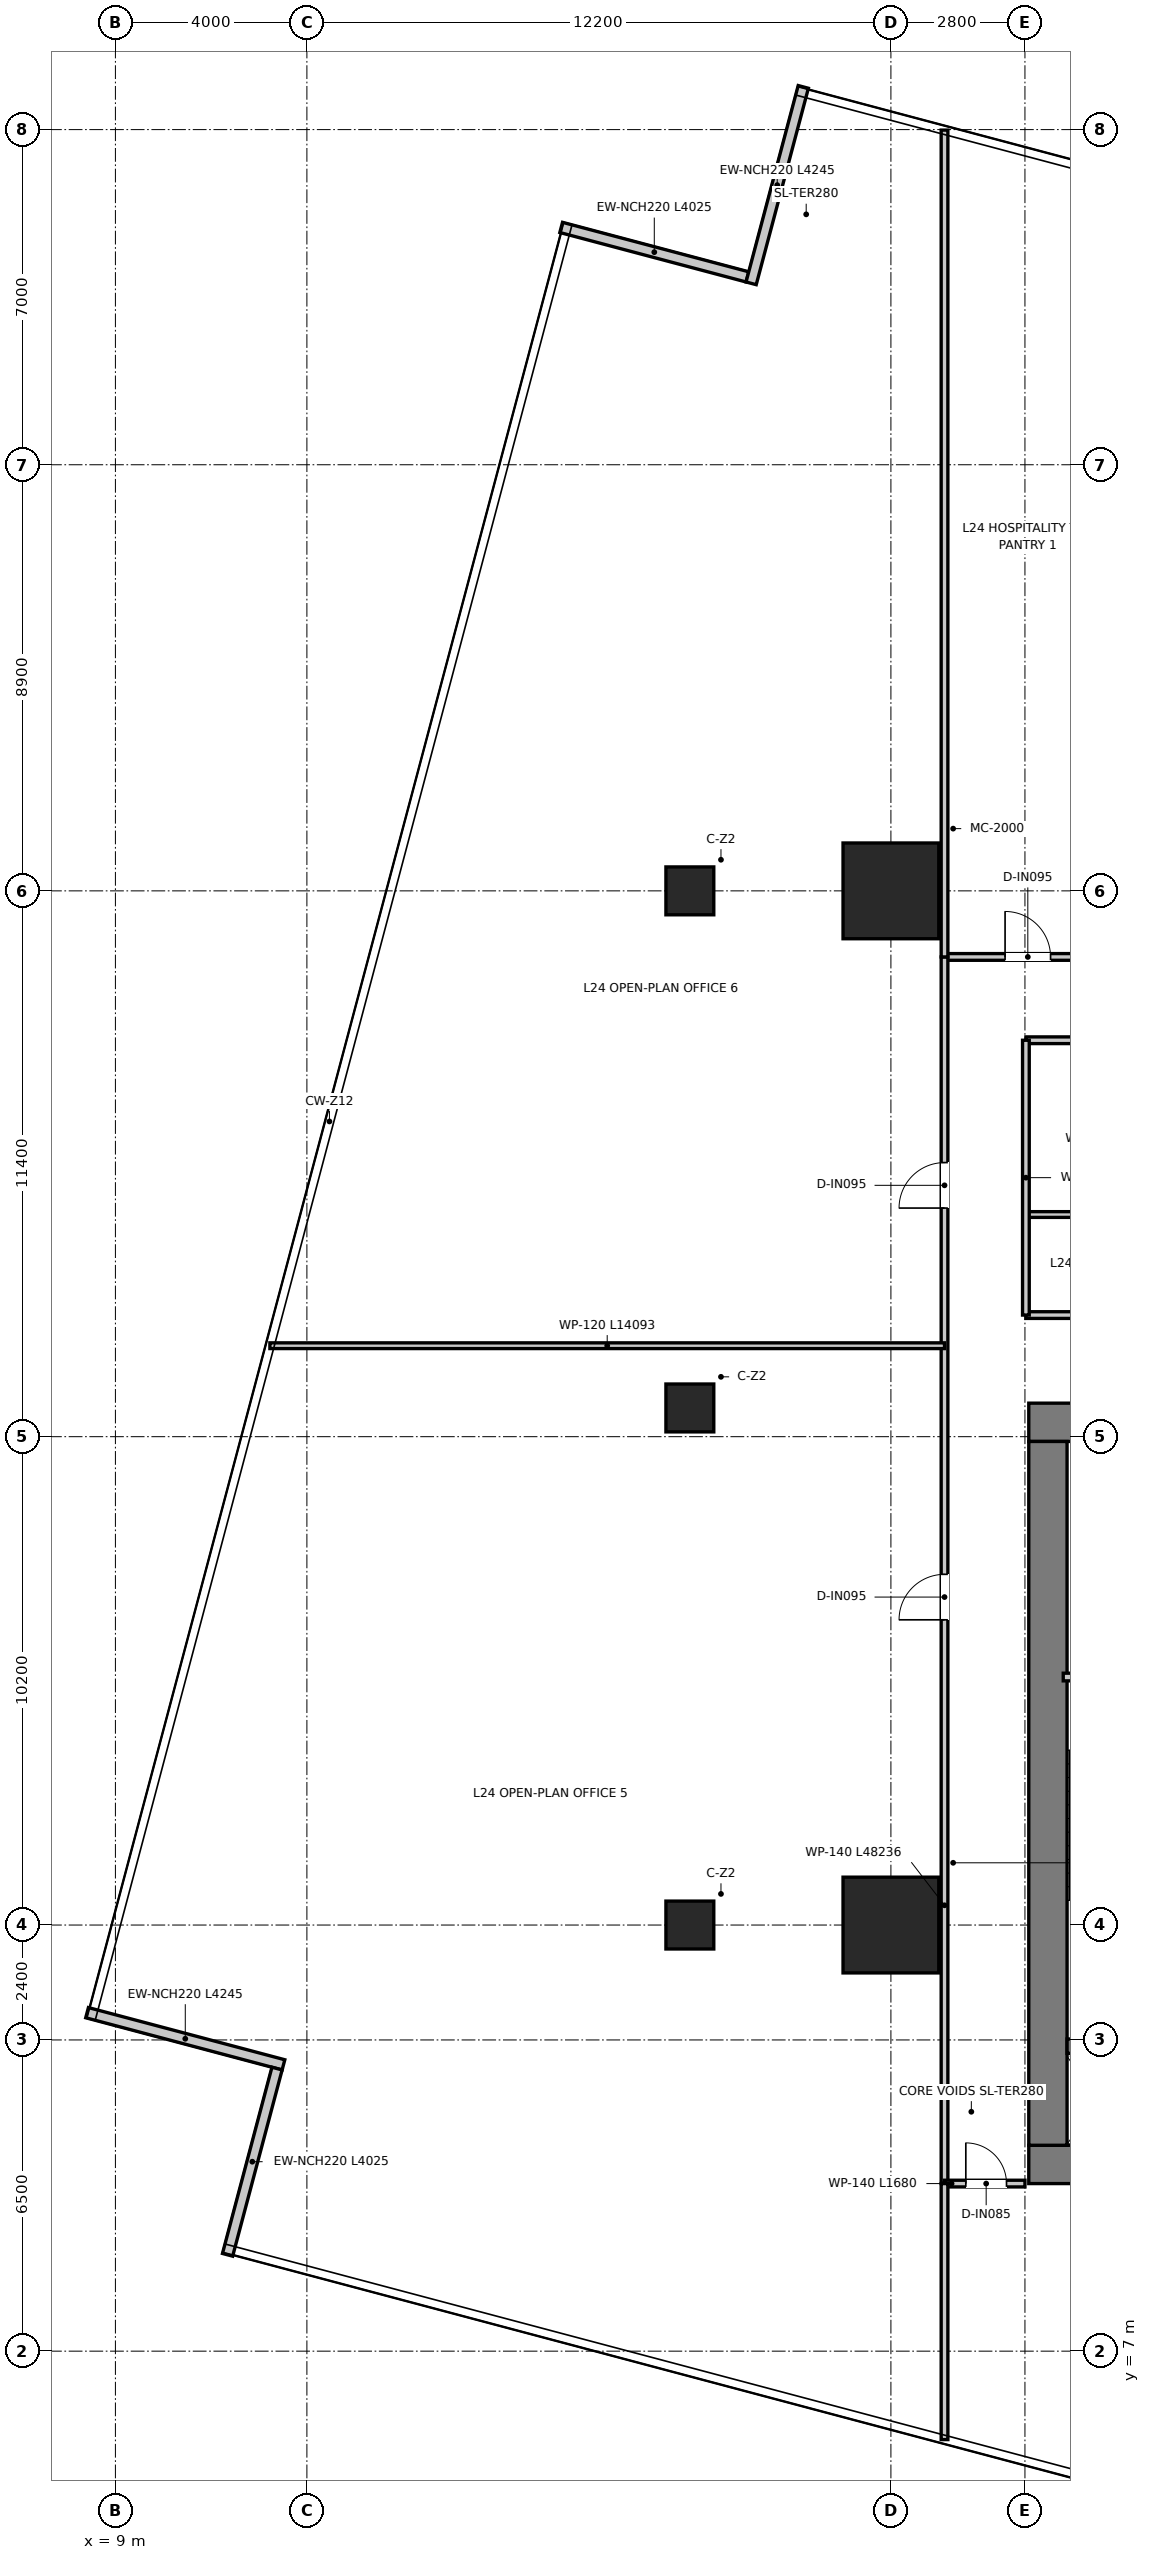
"""IFC4 building model, lengths in metres.
Left out: names, types, materials, properties, quantities, classifications, styles, units other than length and angle.
Written with IfcOpenShell. Run it as: python <this file> out.ifc"""

import sys

from ifc_helpers import new_model, si_unit, direction, frame, frame_2d, origin, origin_2d, place, context, subcontext, project, spatial, rectangle, extrude, source, transform, mapped, element, fill, save


model = new_model("IFC4")
c1 = context("Model", 3, precision=1e-05, world=origin(), true_north=direction((0.0, 1.0)))
c2 = subcontext(c1, "Body", "Model", "MODEL_VIEW")
j1 = project(units=[si_unit("LENGTHUNIT", "METRE"), si_unit("PLANEANGLEUNIT", "RADIAN")], contexts=[c1])
p1 = place(None, origin())
s1 = spatial("IfcSite", under=j1, at=p1, CompositionType="ELEMENT")
p2 = place(p1, origin())
s2 = spatial("IfcBuilding", under=s1, at=p2, CompositionType="ELEMENT")
p3 = place(p2, frame((0.0, 0.0, 101.9)))
s3 = spatial("IfcBuildingStorey", under=s2, at=p3, CompositionType="ELEMENT", Elevation=101.9)
p4 = place(p3, frame((28.08, 10.9, 0.0), z_axis=(0.0, 0.0, 1.0), x_axis=(1.0, 0.0, 0.0)))
e1 = element("IfcWall", 1, at=p4, inside=s3, PredefinedType="SHEAR", context=c2, shape_type="SweptSolid", body=[
    extrude(rectangle(XDim=15.84, YDim=0.8, at=frame_2d((7.92, 0.0))), origin(), (0.0, 0.0, 1.0), 3.95),
])
p5 = place(p3, frame((28.08, 26.4, 0.0), z_axis=(0.0, 0.0, 1.0), x_axis=(1.0, 0.0, 0.0)))
e2 = element("IfcWall", 2, at=p5, inside=s3, PredefinedType="SHEAR", context=c2, shape_type="SweptSolid", body=[
    extrude(rectangle(XDim=15.84, YDim=0.8, at=frame_2d((7.92, 0.0))), origin(), (0.0, 0.0, 1.0), 3.95),
])
p6 = place(p5, frame((7.22, 0.0, 0.0)))
e3 = element("IfcOpeningElement", 3, at=p6, cuts=e2, PredefinedType="OPENING", context=c2, shape_type="SweptSolid", body=[
    extrude(rectangle(XDim=1.4, YDim=2.2, at=frame_2d((0.7, 1.1))), frame((0.0, 0.41, 0.0), z_axis=(0.0, -1.0, 0.0), x_axis=(1.0, 0.0, 0.0)), (0.0, 0.0, 1.0), 0.82),
])
p7 = place(p5, frame((1.775, 0.0, 0.0)))
e4 = element("IfcOpeningElement", 4, at=p7, cuts=e2, PredefinedType="OPENING", context=c2, shape_type="SweptSolid", body=[
    extrude(rectangle(XDim=1.05, YDim=2.1, at=frame_2d((0.525, 1.05))), frame((0.0, 0.41, 0.0), z_axis=(0.0, -1.0, 0.0), x_axis=(1.0, 0.0, 0.0)), (0.0, 0.0, 1.0), 0.82),
])
p8 = place(p5, frame((13.015, 0.0, 0.0)))
e5 = element("IfcOpeningElement", 5, at=p8, cuts=e2, PredefinedType="OPENING", context=c2, shape_type="SweptSolid", body=[
    extrude(rectangle(XDim=1.05, YDim=2.1, at=frame_2d((0.525, 1.05))), frame((0.0, 0.41, 0.0), z_axis=(0.0, -1.0, 0.0), x_axis=(1.0, 0.0, 0.0)), (0.0, 0.0, 1.0), 0.82),
])
p9 = place(p3, frame((28.48, 11.3, 0.0), z_axis=(0.0, 0.0, 1.0), x_axis=(0.0, 1.0, 0.0)))
e6 = element("IfcWall", 6, at=p9, inside=s3, PredefinedType="SHEAR", context=c2, shape_type="SweptSolid", body=[
    extrude(rectangle(XDim=14.7, YDim=0.8, at=frame_2d((7.35, 0.0))), origin(), (0.0, 0.0, 1.0), 3.95),
])
p10 = place(p3, frame((28.88, 13.37, 0.0), z_axis=(0.0, 0.0, 1.0), x_axis=(1.0, 0.0, 0.0)))
e7 = element("IfcWall", 7, at=p10, inside=s3, PredefinedType="SHEAR", context=c2, shape_type="SweptSolid", body=[
    extrude(rectangle(XDim=3.1, YDim=0.3, at=frame_2d((1.55, 0.0))), origin(), (0.0, 0.0, 1.0), 3.95),
])
m1 = source(origin(), c2, "Body", "SweptSolid", [
    extrude(rectangle(XDim=2.0, YDim=2.0, at=origin_2d()), origin(), (0.0, 0.0, 1.0), 3.95),
])
for number, where, z_axis, x_axis in (
    (8, (25.2, 15.9, 0.0), (0.0, 0.0, 1.0), (1.0, 0.0, 0.0)),
    (9, (25.2, 37.5, 0.0), (0.0, 0.0, 1.0), (1.0, 0.0, 0.0)),
):
    element("IfcColumn", number, at=place(p3, frame(where, z_axis=z_axis, x_axis=x_axis)), inside=s3, PredefinedType="USERDEFINED", context=c2, shape_type="MappedRepresentation", body=[
        mapped(m1, transform((0.0, 0.0, 0.0), x_axis=(1.0, 0.0, 0.0), y_axis=(0.0, 1.0, 0.0), z_axis=(0.0, 0.0, 1.0), scale=1.0)),
    ])
m2 = source(origin(), c2, "Body", "SweptSolid", [
    extrude(rectangle(XDim=1.0, YDim=1.0, at=origin_2d()), origin(), (0.0, 0.0, 1.0), 3.95),
])
for number, where, z_axis, x_axis in (
    (10, (21.0, 15.9, 0.0), (0.0, 0.0, 1.0), (1.0, 0.0, 0.0)),
    (11, (21.0, 26.7, 0.0), (0.0, 0.0, 1.0), (1.0, 0.0, 0.0)),
    (12, (21.0, 37.5, 0.0), (0.0, 0.0, 1.0), (1.0, 0.0, 0.0)),
):
    element("IfcColumn", number, at=place(p3, frame(where, z_axis=z_axis, x_axis=x_axis)), inside=s3, PredefinedType="COLUMN", context=c2, shape_type="MappedRepresentation", body=[
        mapped(m2, transform((0.0, 0.0, 0.0), x_axis=(1.0, 0.0, 0.0), y_axis=(0.0, 1.0, 0.0), z_axis=(0.0, 0.0, 1.0), scale=1.0)),
    ])
p11 = place(p3, frame((22.202, 50.324, 0.0), z_axis=(0.0, 0.0, 1.0), x_axis=(-0.966492181189, 0.256696053144, 0.0)))
e13 = element("IfcWall", 13, at=p11, inside=s3, PredefinedType="ELEMENTEDWALL", context=c2, shape_type="SweptSolid", body=[
    extrude(rectangle(XDim=4.025, YDim=0.22, at=frame_2d((2.012, 0.0))), origin(), (0.0, 0.0, 1.0), 3.67),
])
p12 = place(p3, frame((8.408, 14.07, 0.0), z_axis=(0.0, 0.0, 1.0), x_axis=(0.966496943173, -0.256678123022, 0.0)))
e14 = element("IfcWall", 14, at=p12, inside=s3, PredefinedType="ELEMENTEDWALL", context=c2, shape_type="SweptSolid", body=[
    extrude(rectangle(XDim=4.245, YDim=0.22, at=frame_2d((2.123, 0.0))), origin(), (0.0, 0.0, 1.0), 3.67),
])
p13 = place(p3, frame((12.376, 12.902, 0.0), z_axis=(0.0, 0.0, 1.0), x_axis=(-0.256696053144, -0.966492181189, 0.0)))
e15 = element("IfcWall", 15, at=p13, inside=s3, PredefinedType="ELEMENTEDWALL", context=c2, shape_type="SweptSolid", body=[
    extrude(rectangle(XDim=4.025, YDim=0.22, at=frame_2d((2.012, 0.0))), origin(), (0.0, 0.0, 1.0), 3.67),
])
p14 = place(p3, frame((23.37, 54.292, 0.0), z_axis=(0.0, 0.0, 1.0), x_axis=(-0.256678123022, -0.966496943173, 0.0)))
e16 = element("IfcWall", 16, at=p14, inside=s3, PredefinedType="ELEMENTEDWALL", context=c2, shape_type="SweptSolid", body=[
    extrude(rectangle(XDim=4.245, YDim=0.22, at=frame_2d((2.123, 0.0))), origin(), (0.0, 0.0, 1.0), 3.67),
])
p15 = place(p3, frame((28.8, 21.08, 0.0), z_axis=(0.0, 0.0, 1.0), x_axis=(1.0, 0.0, 0.0)))
e17 = element("IfcWall", 17, at=p15, inside=s3, PredefinedType="PARTITIONING", context=c2, shape_type="SweptSolid", body=[
    extrude(rectangle(XDim=3.16, YDim=0.16, at=frame_2d((1.58, 0.0))), origin(), (0.0, 0.0, 1.0), 3.67),
])
p16 = place(p15, frame((1.055, 0.0, 0.0)))
e18 = element("IfcOpeningElement", 18, at=p16, cuts=e17, PredefinedType="OPENING", context=c2, shape_type="SweptSolid", body=[
    extrude(rectangle(XDim=1.05, YDim=2.1, at=frame_2d((0.525, 1.05))), frame((0.0, 0.09, 0.0), z_axis=(0.0, -1.0, 0.0), x_axis=(1.0, 0.0, 0.0)), (0.0, 0.0, 1.0), 0.18),
])
p17 = place(p3, frame((28.02, 28.64, 0.0), z_axis=(0.0, 0.0, 1.0), x_axis=(1.0, 0.0, 0.0)))
e19 = element("IfcWall", 19, at=p17, inside=s3, PredefinedType="PARTITIONING", context=c2, shape_type="SweptSolid", body=[
    extrude(rectangle(XDim=15.96, YDim=0.14, at=frame_2d((7.98, 0.0))), origin(), (0.0, 0.0, 1.0), 3.08),
])
p18 = place(p17, frame((7.455, 0.0, 0.0)))
e20 = element("IfcOpeningElement", 20, at=p18, cuts=e19, PredefinedType="OPENING", context=c2, shape_type="SweptSolid", body=[
    extrude(rectangle(XDim=1.05, YDim=2.15, at=frame_2d((0.525, 1.075))), frame((0.0, 0.08, 0.0), z_axis=(0.0, -1.0, 0.0), x_axis=(1.0, 0.0, 0.0)), (0.0, 0.0, 1.0), 0.16),
])
p19 = place(p3, frame((28.02, 30.74, 0.0), z_axis=(0.0, 0.0, 1.0), x_axis=(1.0, 0.0, 0.0)))
e21 = element("IfcWall", 21, at=p19, inside=s3, PredefinedType="PARTITIONING", context=c2, shape_type="SweptSolid", body=[
    extrude(rectangle(XDim=15.96, YDim=0.12, at=frame_2d((7.98, 0.0))), origin(), (0.0, 0.0, 1.0), 3.08),
])
p20 = place(p3, frame((28.02, 34.38, 0.0), z_axis=(0.0, 0.0, 1.0), x_axis=(1.0, 0.0, 0.0)))
e22 = element("IfcWall", 22, at=p20, inside=s3, PredefinedType="PARTITIONING", context=c2, shape_type="SweptSolid", body=[
    extrude(rectangle(XDim=15.96, YDim=0.14, at=frame_2d((7.98, 0.0))), origin(), (0.0, 0.0, 1.0), 3.08),
])
p21 = place(p20, frame((1.13, 0.0, 0.0)))
e23 = element("IfcOpeningElement", 23, at=p21, cuts=e22, PredefinedType="OPENING", context=c2, shape_type="SweptSolid", body=[
    extrude(rectangle(XDim=0.9, YDim=2.1, at=frame_2d((0.45, 1.05))), frame((0.0, 0.08, 0.0), z_axis=(0.0, -1.0, 0.0), x_axis=(1.0, 0.0, 0.0)), (0.0, 0.0, 1.0), 0.16),
])
p22 = place(p20, frame((4.33, 0.0, 0.0)))
e24 = element("IfcOpeningElement", 24, at=p22, cuts=e22, PredefinedType="OPENING", context=c2, shape_type="SweptSolid", body=[
    extrude(rectangle(XDim=0.9, YDim=2.1, at=frame_2d((0.45, 1.05))), frame((0.0, 0.08, 0.0), z_axis=(0.0, -1.0, 0.0), x_axis=(1.0, 0.0, 0.0)), (0.0, 0.0, 1.0), 0.16),
])
p23 = place(p20, frame((7.355, 0.0, 0.0)))
e25 = element("IfcOpeningElement", 25, at=p23, cuts=e22, PredefinedType="OPENING", context=c2, shape_type="SweptSolid", body=[
    extrude(rectangle(XDim=0.95, YDim=2.1, at=frame_2d((0.475, 1.05))), frame((0.0, 0.08, 0.0), z_axis=(0.0, -1.0, 0.0), x_axis=(1.0, 0.0, 0.0)), (0.0, 0.0, 1.0), 0.16),
])
p24 = place(p20, frame((12.23, 0.0, 0.0)))
e26 = element("IfcOpeningElement", 26, at=p24, cuts=e22, PredefinedType="OPENING", context=c2, shape_type="SweptSolid", body=[
    extrude(rectangle(XDim=0.95, YDim=2.1, at=frame_2d((0.475, 1.05))), frame((0.0, 0.08, 0.0), z_axis=(0.0, -1.0, 0.0), x_axis=(1.0, 0.0, 0.0)), (0.0, 0.0, 1.0), 0.16),
])
p25 = place(p3, frame((28.02, 28.64, 0.0), z_axis=(0.0, 0.0, 1.0), x_axis=(0.0, 1.0, 0.0)))
e27 = element("IfcWall", 27, at=p25, inside=s3, PredefinedType="PARTITIONING", context=c2, shape_type="SweptSolid", body=[
    extrude(rectangle(XDim=5.74, YDim=0.14, at=frame_2d((2.87, 0.0))), origin(), (0.0, 0.0, 1.0), 3.27),
])
p26 = place(p3, frame((26.32, 36.12, 0.0), z_axis=(0.0, 0.0, 1.0), x_axis=(1.0, 0.0, 0.0)))
e28 = element("IfcWall", 28, at=p26, inside=s3, PredefinedType="PARTITIONING", context=c2, shape_type="SweptSolid", body=[
    extrude(rectangle(XDim=19.36, YDim=0.14, at=frame_2d((9.68, 0.0))), origin(), (0.0, 0.0, 1.0), 3.08),
])
p27 = place(p26, frame((1.265, 0.0, 0.0)))
e29 = element("IfcOpeningElement", 29, at=p27, cuts=e28, PredefinedType="OPENING", context=c2, shape_type="SweptSolid", body=[
    extrude(rectangle(XDim=0.95, YDim=2.1, at=frame_2d((0.475, 1.05))), frame((0.0, 0.08, 0.0), z_axis=(0.0, -1.0, 0.0), x_axis=(1.0, 0.0, 0.0)), (0.0, 0.0, 1.0), 0.16),
])
p28 = place(p26, frame((5.855, 0.0, 0.0)))
e30 = element("IfcOpeningElement", 30, at=p28, cuts=e28, PredefinedType="OPENING", context=c2, shape_type="SweptSolid", body=[
    extrude(rectangle(XDim=0.95, YDim=2.1, at=frame_2d((0.475, 1.05))), frame((0.0, 0.08, 0.0), z_axis=(0.0, -1.0, 0.0), x_axis=(1.0, 0.0, 0.0)), (0.0, 0.0, 1.0), 0.16),
])
p29 = place(p26, frame((11.555, 0.0, 0.0)))
e31 = element("IfcOpeningElement", 31, at=p29, cuts=e28, PredefinedType="OPENING", context=c2, shape_type="SweptSolid", body=[
    extrude(rectangle(XDim=0.95, YDim=2.1, at=frame_2d((0.475, 1.05))), frame((0.0, 0.08, 0.0), z_axis=(0.0, -1.0, 0.0), x_axis=(1.0, 0.0, 0.0)), (0.0, 0.0, 1.0), 0.16),
])
p30 = place(p26, frame((16.645, 0.0, 0.0)))
e32 = element("IfcOpeningElement", 32, at=p30, cuts=e28, PredefinedType="OPENING", context=c2, shape_type="SweptSolid", body=[
    extrude(rectangle(XDim=0.95, YDim=2.1, at=frame_2d((0.475, 1.05))), frame((0.0, 0.08, 0.0), z_axis=(0.0, -1.0, 0.0), x_axis=(1.0, 0.0, 0.0)), (0.0, 0.0, 1.0), 0.16),
])
p31 = place(p3, frame((26.32, 10.5, 0.0), z_axis=(0.0, 0.0, 1.0), x_axis=(0.0, 1.0, 0.0)))
e33 = element("IfcWall", 33, at=p31, inside=s3, PredefinedType="PARTITIONING", context=c2, shape_type="SweptSolid", body=[
    extrude(rectangle(XDim=25.62, YDim=0.14, at=frame_2d((12.81, 0.0))), origin(), (0.0, 0.0, 1.0), 2.97),
])
p32 = place(p31, frame((11.775, 0.0, 0.0)))
e34 = element("IfcOpeningElement", 34, at=p32, cuts=e33, PredefinedType="OPENING", context=c2, shape_type="SweptSolid", body=[
    extrude(rectangle(XDim=0.95, YDim=2.1, at=frame_2d((0.475, 1.05))), frame((0.0, 0.08, 0.0), z_axis=(0.0, -1.0, 0.0), x_axis=(1.0, 0.0, 0.0)), (0.0, 0.0, 1.0), 0.16),
])
p33 = place(p31, frame((20.375, 0.0, 0.0)))
e35 = element("IfcOpeningElement", 35, at=p33, cuts=e33, PredefinedType="OPENING", context=c2, shape_type="SweptSolid", body=[
    extrude(rectangle(XDim=0.95, YDim=2.1, at=frame_2d((0.475, 1.05))), frame((0.0, 0.08, 0.0), z_axis=(0.0, -1.0, 0.0), x_axis=(1.0, 0.0, 0.0)), (0.0, 0.0, 1.0), 0.16),
])
p34 = place(p3, frame((26.32, 10.5, 0.0), z_axis=(0.0, 0.0, 1.0), x_axis=(1.0, 0.0, 0.0)))
e36 = element("IfcWall", 36, at=p34, inside=s3, PredefinedType="PARTITIONING", context=c2, shape_type="SweptSolid", body=[
    extrude(rectangle(XDim=1.68, YDim=0.14, at=frame_2d((0.84, 0.0))), origin(), (0.0, 0.0, 1.0), 3.67),
])
p35 = place(p34, frame((0.445, 0.0, 0.0)))
e37 = element("IfcOpeningElement", 37, at=p35, cuts=e36, PredefinedType="OPENING", context=c2, shape_type="SweptSolid", body=[
    extrude(rectangle(XDim=0.85, YDim=2.1, at=frame_2d((0.425, 1.05))), frame((0.0, 0.08, 0.0), z_axis=(0.0, -1.0, 0.0), x_axis=(1.0, 0.0, 0.0)), (0.0, 0.0, 1.0), 0.16),
])
p36 = place(p3, frame((26.32, 36.12, 0.0), z_axis=(0.0, 0.0, 1.0), x_axis=(0.0, 1.0, 0.0)))
e38 = element("IfcWall", 38, at=p36, inside=s3, PredefinedType="PARTITIONING", context=c2, shape_type="SweptSolid", body=[
    extrude(rectangle(XDim=17.269, YDim=0.14, at=frame_2d((8.635, 0.0))), origin(), (0.0, 0.0, 1.0), 2.97),
])
p37 = place(p3, frame((26.32, 5.153, 0.0), z_axis=(0.0, 0.0, 1.0), x_axis=(0.0, 1.0, 0.0)))
e39 = element("IfcWall", 39, at=p37, inside=s3, PredefinedType="PARTITIONING", context=c2, shape_type="SweptSolid", body=[
    extrude(rectangle(XDim=5.347, YDim=0.14, at=frame_2d((2.674, 0.0))), origin(), (0.0, 0.0, 1.0), 3.67),
])
p38 = place(p3, frame((12.227, 28.0, 0.0), z_axis=(0.0, 0.0, 1.0), x_axis=(1.0, 0.0, 0.0)))
e40 = element("IfcWall", 40, at=p38, inside=s3, PredefinedType="PARTITIONING", context=c2, shape_type="SweptSolid", body=[
    extrude(rectangle(XDim=14.093, YDim=0.12, at=frame_2d((7.046, 0.0))), origin(), (0.0, 0.0, 1.0), 2.97),
])
p39 = place(p27, origin())
e41 = element("IfcDoor", 41, at=p39, inside=s3, OperationType="SINGLE_SWING_LEFT", PredefinedType="DOOR", context=c2, shape_type="SweptSolid", body=[
    extrude(rectangle(XDim=0.95, YDim=2.1, at=frame_2d((0.475, 1.05))), frame((0.0, 0.025, 0.0), z_axis=(0.0, -1.0, 0.0), x_axis=(1.0, 0.0, 0.0)), (0.0, 0.0, 1.0), 0.05),
])
fill(e29, e41)
p40 = place(p32, origin())
e42 = element("IfcDoor", 42, at=p40, inside=s3, OperationType="SINGLE_SWING_LEFT", PredefinedType="DOOR", context=c2, shape_type="SweptSolid", body=[
    extrude(rectangle(XDim=0.95, YDim=2.1, at=frame_2d((0.475, 1.05))), frame((0.0, 0.025, 0.0), z_axis=(0.0, -1.0, 0.0), x_axis=(1.0, 0.0, 0.0)), (0.0, 0.0, 1.0), 0.05),
])
fill(e34, e42)
p41 = place(p33, origin())
e43 = element("IfcDoor", 43, at=p41, inside=s3, OperationType="SINGLE_SWING_LEFT", PredefinedType="DOOR", context=c2, shape_type="SweptSolid", body=[
    extrude(rectangle(XDim=0.95, YDim=2.1, at=frame_2d((0.475, 1.05))), frame((0.0, 0.025, 0.0), z_axis=(0.0, -1.0, 0.0), x_axis=(1.0, 0.0, 0.0)), (0.0, 0.0, 1.0), 0.05),
])
fill(e35, e43)
p42 = place(p35, origin())
e44 = element("IfcDoor", 44, at=p42, inside=s3, OperationType="SINGLE_SWING_LEFT", PredefinedType="DOOR", context=c2, shape_type="SweptSolid", body=[
    extrude(rectangle(XDim=0.85, YDim=2.1, at=frame_2d((0.425, 1.05))), frame((0.0, 0.025, 0.0), z_axis=(0.0, -1.0, 0.0), x_axis=(1.0, 0.0, 0.0)), (0.0, 0.0, 1.0), 0.05),
])
fill(e37, e44)
save(model, sys.argv[1])
